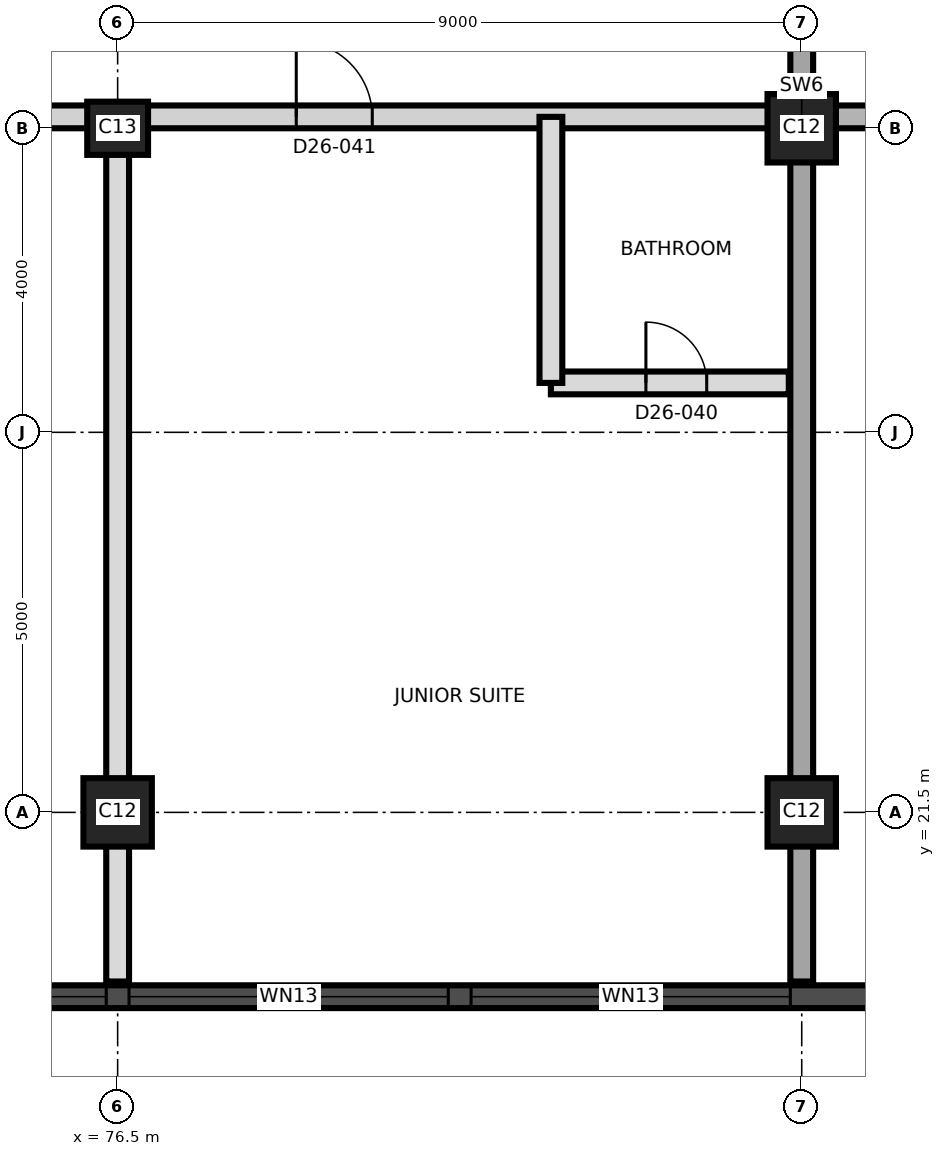
"""IFC4 building model, lengths in metres.
Left out: names, types, materials, properties, quantities, classifications, styles, units other than length and angle.
Written with IfcOpenShell. Run it as: python <this file> out.ifc"""

import sys

from ifc_helpers import new_model, si_unit, direction, frame, frame_2d, origin, origin_2d, place, context, subcontext, project, spatial, rectangle, extrude, element, fill, save


model = new_model("IFC4")
c1 = context("Model", 3, precision=1e-05, world=origin(), true_north=direction((0.0, 1.0)))
c2 = subcontext(c1, "Body", "Model", "MODEL_VIEW")
j1 = project(units=[si_unit("LENGTHUNIT", "METRE"), si_unit("PLANEANGLEUNIT", "RADIAN")], contexts=[c1])
p1 = place(None, origin())
s1 = spatial("IfcSite", under=j1, at=p1, CompositionType="ELEMENT")
p2 = place(p1, origin())
s2 = spatial("IfcBuilding", under=s1, at=p2, CompositionType="ELEMENT")
p3 = place(p2, frame((0.0, 0.0, 240.2)))
s3 = spatial("IfcBuildingStorey", under=s2, at=p3, CompositionType="ELEMENT", Elevation=240.2)
for number, where, z_axis, x_axis in (
    (1, (76.5, 21.5, 0.0), (0.0, 0.0, 1.0), (1.0, 0.0, 0.0)),
    (2, (85.5, 21.5, 0.0), (0.0, 0.0, 1.0), (1.0, 0.0, 0.0)),
):
    element("IfcColumn", number, at=place(p3, frame(where, z_axis=z_axis, x_axis=x_axis)), inside=s3, PredefinedType="COLUMN", context=c2, shape_type="SweptSolid", body=[
        extrude(rectangle(XDim=0.9, YDim=0.9, at=origin_2d()), origin(), (0.0, 0.0, 1.0), 3.7),
    ])
p4 = place(p3, frame((76.5, 30.5, 0.0), z_axis=(0.0, 0.0, 1.0), x_axis=(1.0, 0.0, 0.0)))
e3 = element("IfcColumn", 3, at=p4, inside=s3, PredefinedType="COLUMN", context=c2, shape_type="SweptSolid", body=[
    extrude(rectangle(XDim=0.8, YDim=0.7, at=origin_2d()), origin(), (0.0, 0.0, 1.0), 3.7),
])
p5 = place(p3, frame((85.5, 30.5, 0.0), z_axis=(0.0, 0.0, 1.0), x_axis=(1.0, 0.0, 0.0)))
e4 = element("IfcColumn", 4, at=p5, inside=s3, PredefinedType="COLUMN", context=c2, shape_type="SweptSolid", body=[
    extrude(rectangle(XDim=0.9, YDim=0.9, at=origin_2d()), origin(), (0.0, 0.0, 1.0), 3.7),
])
p6 = place(p3, frame((85.5, 19.275, 0.0), z_axis=(0.0, 0.0, 1.0), x_axis=(0.0, 1.0, 0.0)))
e5 = element("IfcWall", 5, at=p6, inside=s3, PredefinedType="SHEAR", context=c2, shape_type="SweptSolid", body=[
    extrude(rectangle(XDim=22.45, YDim=0.3, at=frame_2d((11.225, 0.0))), origin(), (0.0, 0.0, 1.0), 3.7),
])
p7 = place(p6, frame((12.425, 0.0, 0.0)))
e6 = element("IfcOpeningElement", 6, at=p7, cuts=e5, PredefinedType="OPENING", context=c2, shape_type="SweptSolid", body=[
    extrude(rectangle(XDim=1.4, YDim=2.1, at=frame_2d((0.7, 1.05))), frame((0.0, 0.16, 0.0), z_axis=(0.0, -1.0, 0.0), x_axis=(1.0, 0.0, 0.0)), (0.0, 0.0, 1.0), 0.32),
])
p8 = place(p3, frame((44.01, 19.075, 0.0), z_axis=(0.0, 0.0, 1.0), x_axis=(1.0, 0.0, 0.0)))
e7 = element("IfcWall", 7, at=p8, inside=s3, PredefinedType="SOLIDWALL", context=c2, shape_type="SweptSolid", body=[
    extrude(rectangle(XDim=43.478, YDim=0.3, at=frame_2d((21.739, 0.0))), origin(), (0.0, 0.0, 1.0), 3.4),
])
p9 = place(p8, frame((1.845, 0.0, 0.3)))
e8 = element("IfcOpeningElement", 8, at=p9, cuts=e7, PredefinedType="OPENING", context=c2, shape_type="SweptSolid", body=[
    extrude(rectangle(XDim=1.8, YDim=2.4, at=frame_2d((0.9, 1.2))), frame((0.0, 0.16, 0.0), z_axis=(0.0, -1.0, 0.0), x_axis=(1.0, 0.0, 0.0)), (0.0, 0.0, 1.0), 0.32),
])
p10 = place(p8, frame((5.64, 0.0, 0.9)))
e9 = element("IfcOpeningElement", 9, at=p10, cuts=e7, PredefinedType="OPENING", context=c2, shape_type="SweptSolid", body=[
    extrude(rectangle(XDim=4.2, YDim=1.7, at=frame_2d((2.1, 0.85))), frame((0.0, 0.16, 0.0), z_axis=(0.0, -1.0, 0.0), x_axis=(1.0, 0.0, 0.0)), (0.0, 0.0, 1.0), 0.32),
])
p11 = place(p8, frame((10.14, 0.0, 0.9)))
e10 = element("IfcOpeningElement", 10, at=p11, cuts=e7, PredefinedType="OPENING", context=c2, shape_type="SweptSolid", body=[
    extrude(rectangle(XDim=4.2, YDim=1.7, at=frame_2d((2.1, 0.85))), frame((0.0, 0.16, 0.0), z_axis=(0.0, -1.0, 0.0), x_axis=(1.0, 0.0, 0.0)), (0.0, 0.0, 1.0), 0.32),
])
p12 = place(p8, frame((14.64, 0.0, 0.9)))
e11 = element("IfcOpeningElement", 11, at=p12, cuts=e7, PredefinedType="OPENING", context=c2, shape_type="SweptSolid", body=[
    extrude(rectangle(XDim=4.2, YDim=1.7, at=frame_2d((2.1, 0.85))), frame((0.0, 0.16, 0.0), z_axis=(0.0, -1.0, 0.0), x_axis=(1.0, 0.0, 0.0)), (0.0, 0.0, 1.0), 0.32),
])
p13 = place(p8, frame((19.14, 0.0, 0.9)))
e12 = element("IfcOpeningElement", 12, at=p13, cuts=e7, PredefinedType="OPENING", context=c2, shape_type="SweptSolid", body=[
    extrude(rectangle(XDim=4.2, YDim=1.7, at=frame_2d((2.1, 0.85))), frame((0.0, 0.16, 0.0), z_axis=(0.0, -1.0, 0.0), x_axis=(1.0, 0.0, 0.0)), (0.0, 0.0, 1.0), 0.32),
])
p14 = place(p8, frame((23.64, 0.0, 0.9)))
e13 = element("IfcOpeningElement", 13, at=p14, cuts=e7, PredefinedType="OPENING", context=c2, shape_type="SweptSolid", body=[
    extrude(rectangle(XDim=4.2, YDim=1.7, at=frame_2d((2.1, 0.85))), frame((0.0, 0.16, 0.0), z_axis=(0.0, -1.0, 0.0), x_axis=(1.0, 0.0, 0.0)), (0.0, 0.0, 1.0), 0.32),
])
p15 = place(p8, frame((28.14, 0.0, 0.9)))
e14 = element("IfcOpeningElement", 14, at=p15, cuts=e7, PredefinedType="OPENING", context=c2, shape_type="SweptSolid", body=[
    extrude(rectangle(XDim=4.2, YDim=1.7, at=frame_2d((2.1, 0.85))), frame((0.0, 0.16, 0.0), z_axis=(0.0, -1.0, 0.0), x_axis=(1.0, 0.0, 0.0)), (0.0, 0.0, 1.0), 0.32),
])
p16 = place(p8, frame((32.64, 0.0, 0.9)))
e15 = element("IfcOpeningElement", 15, at=p16, cuts=e7, PredefinedType="OPENING", context=c2, shape_type="SweptSolid", body=[
    extrude(rectangle(XDim=4.2, YDim=1.7, at=frame_2d((2.1, 0.85))), frame((0.0, 0.16, 0.0), z_axis=(0.0, -1.0, 0.0), x_axis=(1.0, 0.0, 0.0)), (0.0, 0.0, 1.0), 0.32),
])
p17 = place(p8, frame((37.14, 0.0, 0.9)))
e16 = element("IfcOpeningElement", 16, at=p17, cuts=e7, PredefinedType="OPENING", context=c2, shape_type="SweptSolid", body=[
    extrude(rectangle(XDim=4.2, YDim=1.7, at=frame_2d((2.1, 0.85))), frame((0.0, 0.16, 0.0), z_axis=(0.0, -1.0, 0.0), x_axis=(1.0, 0.0, 0.0)), (0.0, 0.0, 1.0), 0.32),
])
p18 = place(p3, frame((82.2, 27.15, 0.0), z_axis=(0.0, 0.0, 1.0), x_axis=(1.0, 0.0, 0.0)))
e17 = element("IfcWall", 17, at=p18, inside=s3, PredefinedType="PARTITIONING", context=c2, shape_type="SweptSolid", body=[
    extrude(rectangle(XDim=3.13, YDim=0.3, at=frame_2d((1.565, 0.0))), origin(), (0.0, 0.0, 1.0), 3.4),
])
p19 = place(p18, frame((1.25, 0.0, 0.0)))
e18 = element("IfcOpeningElement", 18, at=p19, cuts=e17, PredefinedType="OPENING", context=c2, shape_type="SweptSolid", body=[
    extrude(rectangle(XDim=0.8, YDim=2.1, at=frame_2d((0.4, 1.05))), frame((0.0, 0.16, 0.0), z_axis=(0.0, -1.0, 0.0), x_axis=(1.0, 0.0, 0.0)), (0.0, 0.0, 1.0), 0.32),
])
p20 = place(p3, frame((58.55, 30.65, 0.0), z_axis=(0.0, 0.0, 1.0), x_axis=(1.0, 0.0, 0.0)))
e19 = element("IfcWall", 19, at=p20, inside=s3, PredefinedType="PARTITIONING", context=c2, shape_type="SweptSolid", body=[
    extrude(rectangle(XDim=26.78, YDim=0.3, at=frame_2d((13.39, 0.0))), origin(), (0.0, 0.0, 1.0), 3.4),
])
p21 = place(p20, frame((1.085, 0.0, 0.0)))
e20 = element("IfcOpeningElement", 20, at=p21, cuts=e19, PredefinedType="OPENING", context=c2, shape_type="SweptSolid", body=[
    extrude(rectangle(XDim=1.2, YDim=2.1, at=frame_2d((0.6, 1.05))), frame((0.0, 0.16, 0.0), z_axis=(0.0, -1.0, 0.0), x_axis=(1.0, 0.0, 0.0)), (0.0, 0.0, 1.0), 0.32),
])
p22 = place(p20, frame((4.335, 0.0, 0.0)))
e21 = element("IfcOpeningElement", 21, at=p22, cuts=e19, PredefinedType="OPENING", context=c2, shape_type="SweptSolid", body=[
    extrude(rectangle(XDim=1.0, YDim=2.1, at=frame_2d((0.5, 1.05))), frame((0.0, 0.16, 0.0), z_axis=(0.0, -1.0, 0.0), x_axis=(1.0, 0.0, 0.0)), (0.0, 0.0, 1.0), 0.32),
])
p23 = place(p20, frame((14.6, 0.0, 0.0)))
e22 = element("IfcOpeningElement", 22, at=p23, cuts=e19, PredefinedType="OPENING", context=c2, shape_type="SweptSolid", body=[
    extrude(rectangle(XDim=1.0, YDim=2.4, at=frame_2d((0.5, 1.2))), frame((0.0, 0.16, 0.0), z_axis=(0.0, -1.0, 0.0), x_axis=(1.0, 0.0, 0.0)), (0.0, 0.0, 1.0), 0.32),
])
p24 = place(p20, frame((20.3, 0.0, 0.0)))
e23 = element("IfcOpeningElement", 23, at=p24, cuts=e19, PredefinedType="OPENING", context=c2, shape_type="SweptSolid", body=[
    extrude(rectangle(XDim=1.0, YDim=2.4, at=frame_2d((0.5, 1.2))), frame((0.0, 0.16, 0.0), z_axis=(0.0, -1.0, 0.0), x_axis=(1.0, 0.0, 0.0)), (0.0, 0.0, 1.0), 0.32),
])
p25 = place(p3, frame((85.67, 30.65, 0.0), z_axis=(0.0, 0.0, 1.0), x_axis=(1.0, 0.0, 0.0)))
e24 = element("IfcWall", 24, at=p25, inside=s3, PredefinedType="SHEAR", context=c2, shape_type="SweptSolid", body=[
    extrude(rectangle(XDim=9.58, YDim=0.3, at=frame_2d((4.79, 0.0))), origin(), (0.0, 0.0, 1.0), 3.4),
])
p26 = place(p25, frame((2.08, 0.0, 0.0)))
e25 = element("IfcOpeningElement", 25, at=p26, cuts=e24, PredefinedType="OPENING", context=c2, shape_type="SweptSolid", body=[
    extrude(rectangle(XDim=1.2, YDim=2.1, at=frame_2d((0.6, 1.05))), frame((0.0, 0.16, 0.0), z_axis=(0.0, -1.0, 0.0), x_axis=(1.0, 0.0, 0.0)), (0.0, 0.0, 1.0), 0.32),
])
p27 = place(p25, frame((5.63, 0.0, 0.0)))
e26 = element("IfcOpeningElement", 26, at=p27, cuts=e24, PredefinedType="OPENING", context=c2, shape_type="SweptSolid", body=[
    extrude(rectangle(XDim=1.0, YDim=2.1, at=frame_2d((0.5, 1.05))), frame((0.0, 0.16, 0.0), z_axis=(0.0, -1.0, 0.0), x_axis=(1.0, 0.0, 0.0)), (0.0, 0.0, 1.0), 0.32),
])
p28 = place(p3, frame((76.5, 19.275, 0.0), z_axis=(0.0, 0.0, 1.0), x_axis=(0.0, 1.0, 0.0)))
e27 = element("IfcWall", 27, at=p28, inside=s3, PredefinedType="PARTITIONING", context=c2, shape_type="SweptSolid", body=[
    extrude(rectangle(XDim=11.375, YDim=0.3, at=frame_2d((5.688, 0.0))), origin(), (0.0, 0.0, 1.0), 3.35),
])
p29 = place(p3, frame((82.2, 27.15, 0.0), z_axis=(0.0, 0.0, 1.0), x_axis=(0.0, 1.0, 0.0)))
e28 = element("IfcWall", 28, at=p29, inside=s3, PredefinedType="PARTITIONING", context=c2, shape_type="SweptSolid", body=[
    extrude(rectangle(XDim=3.5, YDim=0.3, at=frame_2d((1.75, 0.0))), origin(), (0.0, 0.0, 1.0), 3.4),
])
p30 = place(p15, origin())
e29 = element("IfcWindow", 29, at=p30, inside=s3, PartitioningType="SINGLE_PANEL", PredefinedType="WINDOW", context=c2, shape_type="SweptSolid", body=[
    extrude(rectangle(XDim=4.2, YDim=1.7, at=frame_2d((2.1, 0.85))), frame((0.0, 0.03, 0.0), z_axis=(0.0, -1.0, 0.0), x_axis=(1.0, 0.0, 0.0)), (0.0, 0.0, 1.0), 0.06),
])
fill(e14, e29)
p31 = place(p16, origin())
e30 = element("IfcWindow", 30, at=p31, inside=s3, PartitioningType="SINGLE_PANEL", PredefinedType="WINDOW", context=c2, shape_type="SweptSolid", body=[
    extrude(rectangle(XDim=4.2, YDim=1.7, at=frame_2d((2.1, 0.85))), frame((0.0, 0.03, 0.0), z_axis=(0.0, -1.0, 0.0), x_axis=(1.0, 0.0, 0.0)), (0.0, 0.0, 1.0), 0.06),
])
fill(e15, e30)
p32 = place(p17, origin())
e31 = element("IfcWindow", 31, at=p32, inside=s3, PartitioningType="SINGLE_PANEL", PredefinedType="WINDOW", context=c2, shape_type="SweptSolid", body=[
    extrude(rectangle(XDim=4.2, YDim=1.7, at=frame_2d((2.1, 0.85))), frame((0.0, 0.03, 0.0), z_axis=(0.0, -1.0, 0.0), x_axis=(1.0, 0.0, 0.0)), (0.0, 0.0, 1.0), 0.06),
])
fill(e16, e31)
p33 = place(p19, origin())
e32 = element("IfcDoor", 32, at=p33, inside=s3, OperationType="SINGLE_SWING_LEFT", PredefinedType="DOOR", context=c2, shape_type="SweptSolid", body=[
    extrude(rectangle(XDim=0.8, YDim=2.1, at=frame_2d((0.4, 1.05))), frame((0.0, 0.025, 0.0), z_axis=(0.0, -1.0, 0.0), x_axis=(1.0, 0.0, 0.0)), (0.0, 0.0, 1.0), 0.05),
])
fill(e18, e32)
p34 = place(p24, origin())
e33 = element("IfcDoor", 33, at=p34, inside=s3, OperationType="SINGLE_SWING_RIGHT", PredefinedType="DOOR", context=c2, shape_type="SweptSolid", body=[
    extrude(rectangle(XDim=1.0, YDim=2.4, at=frame_2d((0.5, 1.2))), frame((0.0, 0.025, 0.0), z_axis=(0.0, -1.0, 0.0), x_axis=(1.0, 0.0, 0.0)), (0.0, 0.0, 1.0), 0.05),
])
fill(e23, e33)
save(model, sys.argv[1])
